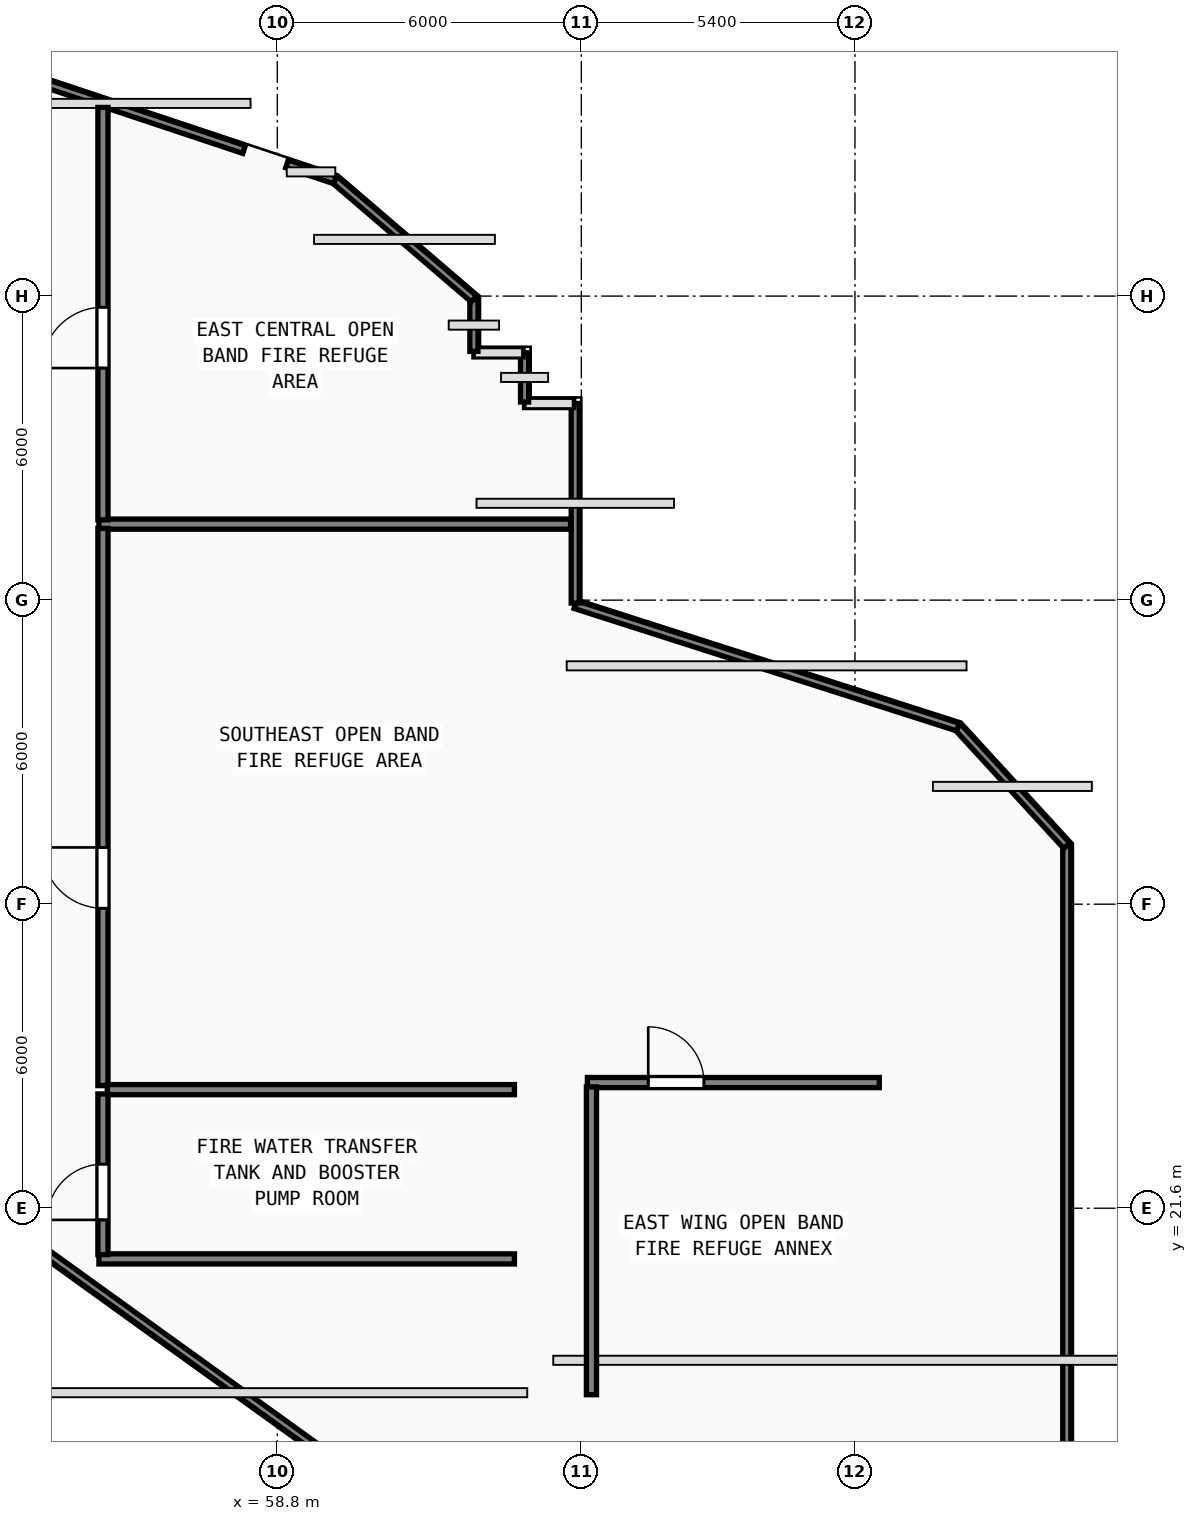
"""IFC4 building model, lengths in metres.
Left out: names, types, materials, properties, quantities, classifications, styles, units other than length and angle.
Written with IfcOpenShell. Run it as: python <this file> out.ifc"""

import sys

from ifc_helpers import new_model, si_unit, direction, frame, frame_2d, origin, origin_2d, place, context, subcontext, project, spatial, rectangle, hollow_rectangle, extrude, element, fill, save


model = new_model("IFC4")
c1 = context("Model", 3, precision=1e-05, world=origin(), true_north=direction((0.0, 1.0)))
c2 = subcontext(c1, "Body", "Model", "MODEL_VIEW")
j1 = project(units=[si_unit("LENGTHUNIT", "METRE"), si_unit("PLANEANGLEUNIT", "RADIAN")], contexts=[c1])
p1 = place(None, origin())
s1 = spatial("IfcSite", under=j1, at=p1, CompositionType="ELEMENT")
p2 = place(p1, origin())
s2 = spatial("IfcBuilding", under=s1, at=p2, CompositionType="ELEMENT")
p3 = place(p2, frame((0.0, 0.0, 43.0)))
s3 = spatial("IfcBuildingStorey", under=s2, at=p3, CompositionType="ELEMENT", Elevation=43.0)
for number, where, z_axis, x_axis in (
    (1, (64.2, 16.8, 0.0), (0.0, 0.0, 1.0), (1.0, 0.0, 0.0)),
    (2, (64.2, 27.6, 0.0), (0.0, 0.0, 1.0), (1.0, 0.0, 0.0)),
):
    element("IfcColumn", number, at=place(p3, frame(where, z_axis=z_axis, x_axis=x_axis)), inside=s3, PredefinedType="COLUMN", context=c2, shape_type="SweptSolid", body=[
        extrude(hollow_rectangle(XDim=1.3, YDim=1.3, WallThickness=0.048, at=origin_2d()), origin(), (0.0, 0.0, 1.0), 4.6),
    ])
for number, where, z_axis, x_axis in (
    (3, (70.8, 17.4, 0.0), (0.0, 0.0, 1.0), (1.0, 0.0, 0.0)),
    (4, (70.8, 27.6, 0.0), (0.0, 0.0, 1.0), (1.0, 0.0, 0.0)),
):
    element("IfcColumn", number, at=place(p3, frame(where, z_axis=z_axis, x_axis=x_axis)), inside=s3, PredefinedType="COLUMN", context=c2, shape_type="SweptSolid", body=[
        extrude(hollow_rectangle(XDim=1.15, YDim=1.15, WallThickness=0.042, at=origin_2d()), origin(), (0.0, 0.0, 1.0), 4.6),
    ])
for number, where, z_axis, x_axis in (
    (5, (58.5, 19.2, 0.0), (0.0, 0.0, 1.0), (1.0, 0.0, 0.0)),
    (6, (58.5, 42.0, 0.0), (0.0, 0.0, 1.0), (1.0, 0.0, 0.0)),
    (7, (67.5, 17.1, 0.0), (0.0, 0.0, 1.0), (1.0, 0.0, 0.0)),
    (8, (67.5, 27.6, 0.0), (0.0, 0.0, 1.0), (1.0, 0.0, 0.0)),
):
    element("IfcColumn", number, at=place(p3, frame(where, z_axis=z_axis, x_axis=x_axis)), inside=s3, PredefinedType="COLUMN", context=c2, shape_type="SweptSolid", body=[
        extrude(hollow_rectangle(XDim=1.0, YDim=1.0, WallThickness=0.038, at=origin_2d()), origin(), (0.0, 0.0, 1.0), 4.6),
    ])
p4 = place(p3, frame((53.442, 21.286, 0.0), z_axis=(0.0, 0.0, 1.0), x_axis=(0.811535155038, -0.584303595863, 0.0)))
e9 = element("IfcWall", 9, at=p4, inside=s3, PredefinedType="PARAPET", context=c2, shape_type="SweptSolid", body=[
    extrude(rectangle(XDim=11.383, YDim=0.16, at=frame_2d((5.692, 0.0))), origin(), (0.0, 0.0, 1.0), 1.15),
])
p5 = place(p3, frame((74.38, 8.445, 0.0), z_axis=(0.0, 0.0, 1.0), x_axis=(0.0, 1.0, 0.0)))
e10 = element("IfcWall", 10, at=p5, inside=s3, PredefinedType="PARAPET", context=c2, shape_type="SweptSolid", body=[
    extrude(rectangle(XDim=20.308, YDim=0.16, at=frame_2d((10.154, 0.0))), origin(), (0.0, 0.0, 1.0), 1.15),
])
p6 = place(p3, frame((74.38, 28.753, 0.0), z_axis=(0.0, 0.0, 1.0), x_axis=(-0.675700269655, 0.737176468418, 0.0)))
e11 = element("IfcWall", 11, at=p6, inside=s3, PredefinedType="PARAPET", context=c2, shape_type="SweptSolid", body=[
    extrude(rectangle(XDim=3.177, YDim=0.16, at=frame_2d((1.588, 0.0))), origin(), (0.0, 0.0, 1.0), 1.15),
])
p7 = place(p3, frame((72.233, 31.095, 0.0), z_axis=(0.0, 0.0, 1.0), x_axis=(-0.95242557697, 0.304771259034, 0.0)))
e12 = element("IfcWall", 12, at=p7, inside=s3, PredefinedType="PARAPET", context=c2, shape_type="SweptSolid", body=[
    extrude(rectangle(XDim=7.93, YDim=0.16, at=frame_2d((3.965, 0.0))), origin(), (0.0, 0.0, 1.0), 1.15),
])
p8 = place(p3, frame((64.68, 33.542, 0.0), z_axis=(0.0, 0.0, 1.0), x_axis=(0.0, 1.0, 0.0)))
e13 = element("IfcWall", 13, at=p8, inside=s3, PredefinedType="PARAPET", context=c2, shape_type="SweptSolid", body=[
    extrude(rectangle(XDim=3.938, YDim=0.16, at=frame_2d((1.969, 0.0))), origin(), (0.0, 0.0, 1.0), 1.15),
])
for number, where, z_axis, x_axis in (
    (14, (64.65, 37.48, 0.0), (0.0, 0.0, 1.0), (-1.0, 0.0, 0.0)),
    (15, (63.68, 37.51, 0.0), (0.0, 0.0, 1.0), (0.0, 1.0, 0.0)),
    (16, (63.65, 38.48, 0.0), (0.0, 0.0, 1.0), (-1.0, 0.0, 0.0)),
):
    element("IfcWall", number, at=place(p3, frame(where, z_axis=z_axis, x_axis=x_axis)), inside=s3, PredefinedType="PARAPET", context=c2, shape_type="SweptSolid", body=[
        extrude(rectangle(XDim=0.97, YDim=0.16, at=frame_2d((0.485, 0.0))), origin(), (0.0, 0.0, 1.0), 1.15),
    ])
p9 = place(p3, frame((62.68, 38.51, 0.0), z_axis=(0.0, 0.0, 1.0), x_axis=(0.0, 1.0, 0.0)))
e17 = element("IfcWall", 17, at=p9, inside=s3, PredefinedType="PARAPET", context=c2, shape_type="SweptSolid", body=[
    extrude(rectangle(XDim=1.035, YDim=0.16, at=frame_2d((0.518, 0.0))), origin(), (0.0, 0.0, 1.0), 1.15),
])
p10 = place(p3, frame((62.68, 39.545, 0.0), z_axis=(0.0, 0.0, 1.0), x_axis=(-0.759275702513, 0.650769089289, 0.0)))
e18 = element("IfcWall", 18, at=p10, inside=s3, PredefinedType="PARAPET", context=c2, shape_type="SweptSolid", body=[
    extrude(rectangle(XDim=3.609, YDim=0.16, at=frame_2d((1.805, 0.0))), origin(), (0.0, 0.0, 1.0), 1.15),
])
p11 = place(p3, frame((59.94, 41.894, 0.0), z_axis=(0.0, 0.0, 1.0), x_axis=(-0.948683298051, 0.316227766017, 0.0)))
e19 = element("IfcWall", 19, at=p11, inside=s3, PredefinedType="PARAPET", context=c2, shape_type="SweptSolid", body=[
    extrude(rectangle(XDim=0.999, YDim=0.16, at=frame_2d((0.5, 0.0))), origin(), (0.0, 0.0, 1.0), 1.15),
])
p12 = place(p3, frame((58.145, 42.492, 0.0), z_axis=(0.0, 0.0, 1.0), x_axis=(-0.948683298051, 0.316227766017, 0.0)))
e20 = element("IfcWall", 20, at=p12, inside=s3, PredefinedType="PARAPET", context=c2, shape_type="SweptSolid", body=[
    extrude(rectangle(XDim=5.76, YDim=0.16, at=frame_2d((2.88, 0.0))), origin(), (0.0, 0.0, 1.0), 1.15),
])
p13 = place(p3, frame((55.28, 35.1, 0.0), z_axis=(0.0, 0.0, 1.0), x_axis=(1.0, 0.0, 0.0)))
e21 = element("IfcWall", 21, at=p13, inside=s3, PredefinedType="SOLIDWALL", context=c2, shape_type="SweptSolid", body=[
    extrude(rectangle(XDim=9.308, YDim=0.2, at=frame_2d((4.654, 0.0))), origin(), (0.0, 0.0, 1.0), 4.4),
])
p14 = place(p3, frame((55.36, 24.02, 0.0), z_axis=(0.0, 0.0, 1.0), x_axis=(0.0, 1.0, 0.0)))
e22 = element("IfcWall", 22, at=p14, inside=s3, PredefinedType="SOLIDWALL", context=c2, shape_type="SweptSolid", body=[
    extrude(rectangle(XDim=10.995, YDim=0.2, at=frame_2d((5.498, 0.0))), origin(), (0.0, 0.0, 1.0), 4.4),
])
p15 = place(p14, frame((3.5, 0.0, 0.0)))
e23 = element("IfcOpeningElement", 23, at=p15, cuts=e22, PredefinedType="OPENING", context=c2, shape_type="SweptSolid", body=[
    extrude(rectangle(XDim=1.2, YDim=2.15, at=frame_2d((0.6, 1.075))), frame((0.0, 0.11, 0.0), z_axis=(0.0, -1.0, 0.0), x_axis=(1.0, 0.0, 0.0)), (0.0, 0.0, 1.0), 0.22),
])
p16 = place(p3, frame((55.36, 35.185, 0.0), z_axis=(0.0, 0.0, 1.0), x_axis=(0.0, 1.0, 0.0)))
e24 = element("IfcWall", 24, at=p16, inside=s3, PredefinedType="SOLIDWALL", context=c2, shape_type="SweptSolid", body=[
    extrude(rectangle(XDim=8.138, YDim=0.2, at=frame_2d((4.069, 0.0))), origin(), (0.0, 0.0, 1.0), 4.4),
])
p17 = place(p16, frame((2.995, 0.0, 0.0)))
e25 = element("IfcOpeningElement", 25, at=p17, cuts=e24, PredefinedType="OPENING", context=c2, shape_type="SweptSolid", body=[
    extrude(rectangle(XDim=1.2, YDim=2.15, at=frame_2d((0.6, 1.075))), frame((0.0, 0.11, 0.0), z_axis=(0.0, -1.0, 0.0), x_axis=(1.0, 0.0, 0.0)), (0.0, 0.0, 1.0), 0.22),
])
p18 = place(p3, frame((55.445, 23.94, 0.0), z_axis=(0.0, 0.0, 1.0), x_axis=(1.0, 0.0, 0.0)))
e26 = element("IfcWall", 26, at=p18, inside=s3, PredefinedType="SOLIDWALL", context=c2, shape_type="SweptSolid", body=[
    extrude(rectangle(XDim=8.035, YDim=0.2, at=frame_2d((4.018, 0.0))), origin(), (0.0, 0.0, 1.0), 4.4),
])
p19 = place(p3, frame((55.28, 20.6, 0.0), z_axis=(0.0, 0.0, 1.0), x_axis=(1.0, 0.0, 0.0)))
e27 = element("IfcWall", 27, at=p19, inside=s3, PredefinedType="SOLIDWALL", context=c2, shape_type="SweptSolid", body=[
    extrude(rectangle(XDim=8.2, YDim=0.2, at=frame_2d((4.1, 0.0))), origin(), (0.0, 0.0, 1.0), 4.4),
])
p20 = place(p3, frame((55.36, 20.685, 0.0), z_axis=(0.0, 0.0, 1.0), x_axis=(0.0, 1.0, 0.0)))
e28 = element("IfcWall", 28, at=p20, inside=s3, PredefinedType="SOLIDWALL", context=c2, shape_type="SweptSolid", body=[
    extrude(rectangle(XDim=3.17, YDim=0.2, at=frame_2d((1.585, 0.0))), origin(), (0.0, 0.0, 1.0), 4.4),
])
p21 = place(p20, frame((0.685, 0.0, 0.0)))
e29 = element("IfcOpeningElement", 29, at=p21, cuts=e28, PredefinedType="OPENING", context=c2, shape_type="SweptSolid", body=[
    extrude(rectangle(XDim=1.1, YDim=2.15, at=frame_2d((0.55, 1.075))), frame((0.0, 0.11, 0.0), z_axis=(0.0, -1.0, 0.0), x_axis=(1.0, 0.0, 0.0)), (0.0, 0.0, 1.0), 0.22),
])
p22 = place(p3, frame((64.92, 24.08, 0.0), z_axis=(0.0, 0.0, 1.0), x_axis=(1.0, 0.0, 0.0)))
e30 = element("IfcWall", 30, at=p22, inside=s3, PredefinedType="SOLIDWALL", context=c2, shape_type="SweptSolid", body=[
    extrude(rectangle(XDim=5.76, YDim=0.2, at=frame_2d((2.88, 0.0))), origin(), (0.0, 0.0, 1.0), 4.4),
])
p23 = place(p22, frame((2.3, 0.0, 0.0), z_axis=(0.0, 0.0, 1.0), x_axis=(-1.0, 0.0, 0.0)))
e31 = element("IfcOpeningElement", 31, at=p23, cuts=e30, PredefinedType="OPENING", context=c2, shape_type="SweptSolid", body=[
    extrude(rectangle(XDim=1.1, YDim=2.15, at=frame_2d((0.55, 1.075))), frame((0.0, 0.11, 0.0), z_axis=(0.0, -1.0, 0.0), x_axis=(1.0, 0.0, 0.0)), (0.0, 0.0, 1.0), 0.22),
])
p24 = place(p3, frame((65.0, 17.92, 0.0), z_axis=(0.0, 0.0, 1.0), x_axis=(0.0, 1.0, 0.0)))
e32 = element("IfcWall", 32, at=p24, inside=s3, PredefinedType="SOLIDWALL", context=c2, shape_type="SweptSolid", body=[
    extrude(rectangle(XDim=6.075, YDim=0.2, at=frame_2d((3.038, 0.0))), origin(), (0.0, 0.0, 1.0), 4.4),
])
p25 = place(p15, origin())
e33 = element("IfcDoor", 33, at=p25, inside=s3, OperationType="SINGLE_SWING_RIGHT", PredefinedType="DOOR", context=c2, shape_type="SweptSolid", body=[
    extrude(rectangle(XDim=1.2, YDim=2.15, at=frame_2d((0.6, 1.075))), frame((0.0, 0.025, 0.0), z_axis=(0.0, -1.0, 0.0), x_axis=(1.0, 0.0, 0.0)), (0.0, 0.0, 1.0), 0.05),
])
fill(e23, e33)
p26 = place(p17, origin())
e34 = element("IfcDoor", 34, at=p26, inside=s3, OperationType="SINGLE_SWING_LEFT", PredefinedType="DOOR", context=c2, shape_type="SweptSolid", body=[
    extrude(rectangle(XDim=1.2, YDim=2.15, at=frame_2d((0.6, 1.075))), frame((0.0, 0.025, 0.0), z_axis=(0.0, -1.0, 0.0), x_axis=(1.0, 0.0, 0.0)), (0.0, 0.0, 1.0), 0.05),
])
fill(e25, e34)
p27 = place(p21, origin())
e35 = element("IfcDoor", 35, at=p27, inside=s3, OperationType="SINGLE_SWING_LEFT", PredefinedType="DOOR", context=c2, shape_type="SweptSolid", body=[
    extrude(rectangle(XDim=1.1, YDim=2.15, at=frame_2d((0.55, 1.075))), frame((0.0, 0.025, 0.0), z_axis=(0.0, -1.0, 0.0), x_axis=(1.0, 0.0, 0.0)), (0.0, 0.0, 1.0), 0.05),
])
fill(e29, e35)
p28 = place(p23, origin())
e36 = element("IfcDoor", 36, at=p28, inside=s3, OperationType="SINGLE_SWING_RIGHT", PredefinedType="DOOR", context=c2, shape_type="SweptSolid", body=[
    extrude(rectangle(XDim=1.1, YDim=2.15, at=frame_2d((0.55, 1.075))), frame((0.0, 0.025, 0.0), z_axis=(0.0, -1.0, 0.0), x_axis=(1.0, 0.0, 0.0)), (0.0, 0.0, 1.0), 0.05),
])
fill(e31, e36)
save(model, sys.argv[1])
